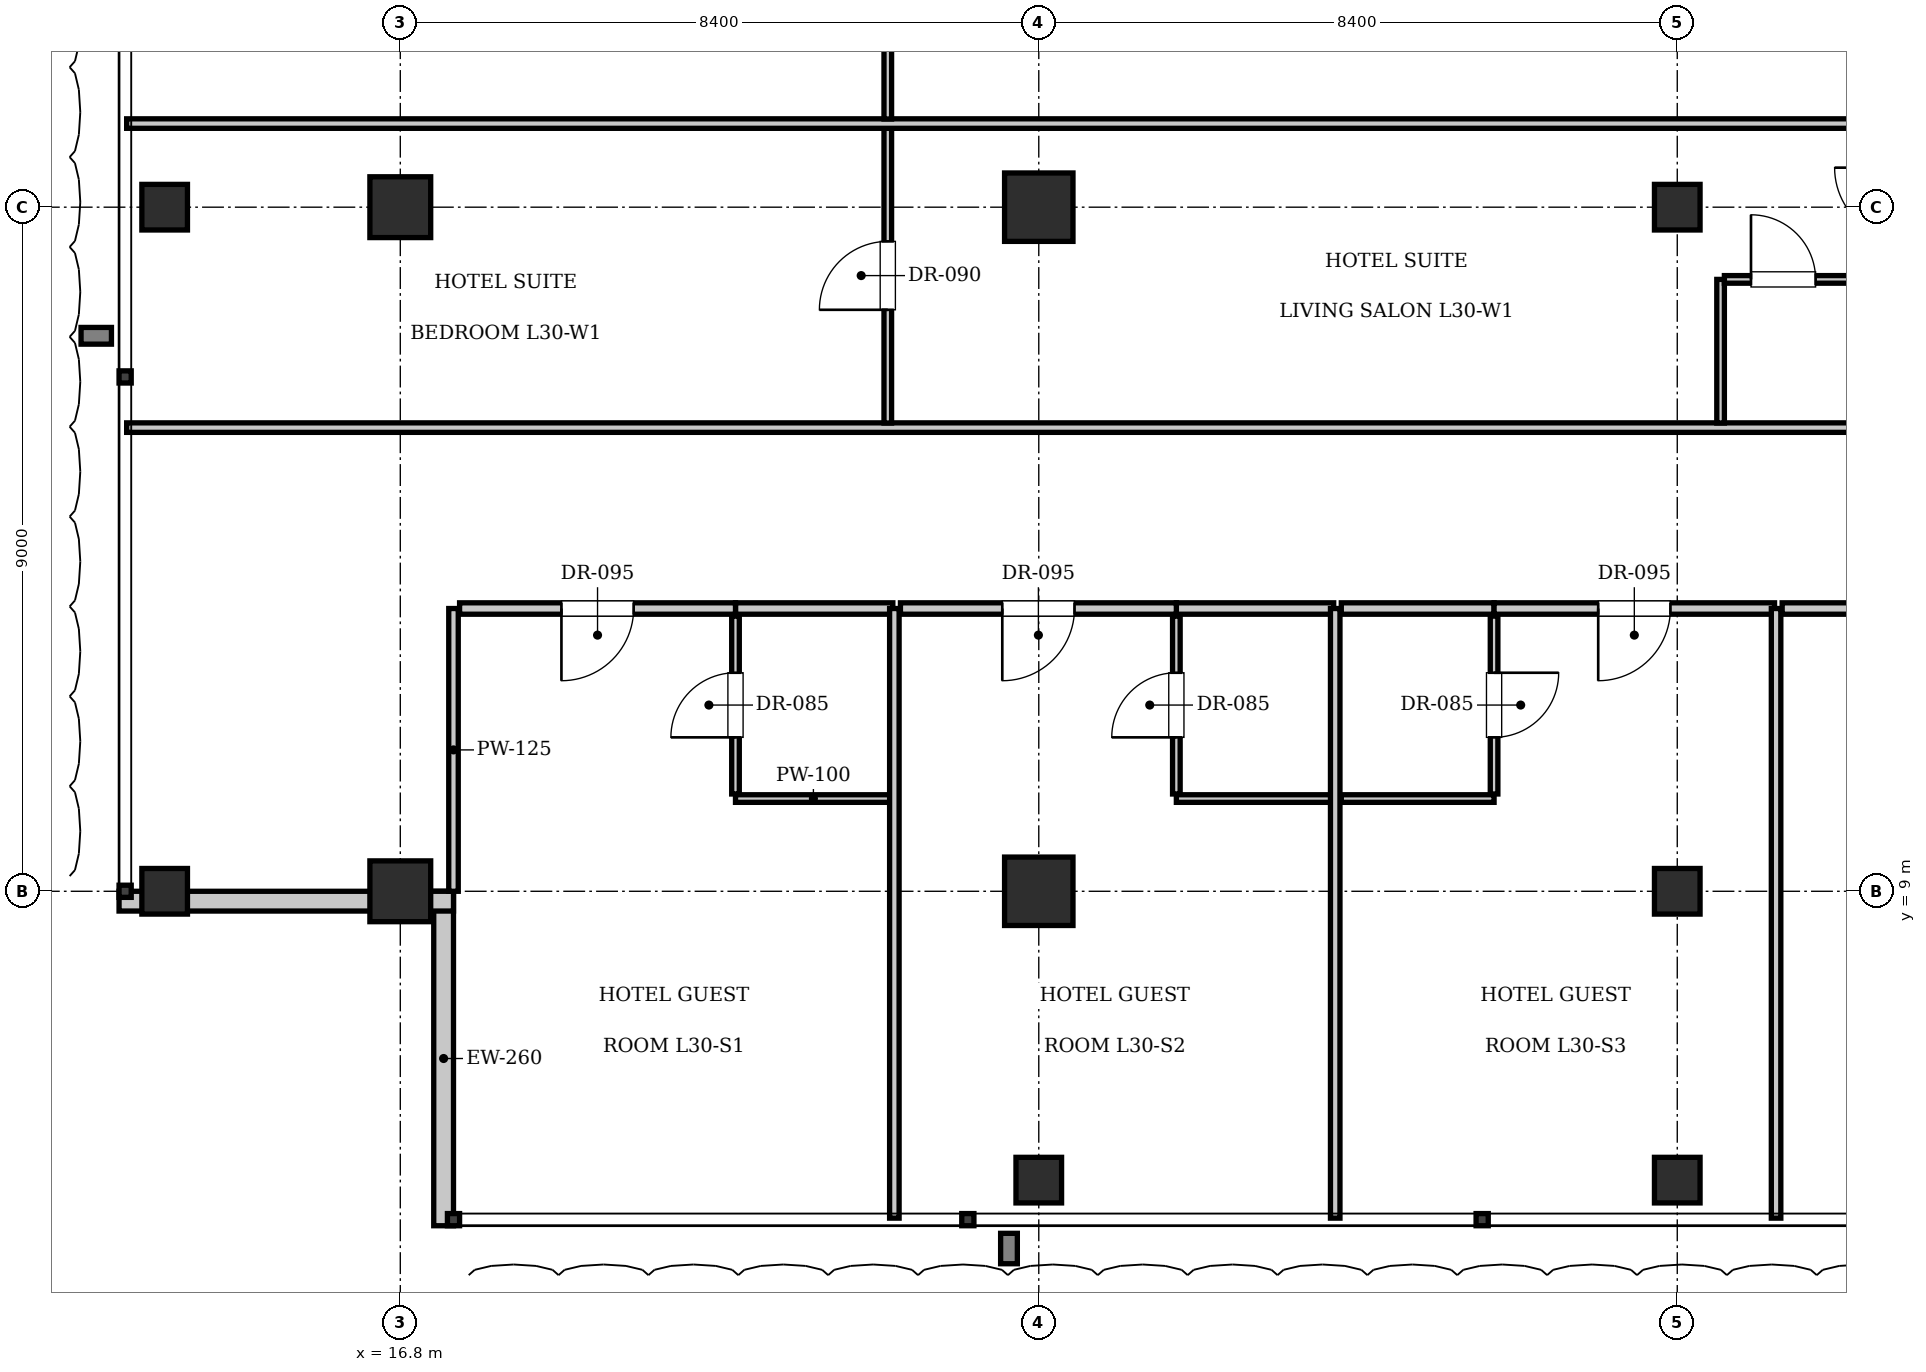
"""IFC4 building model, lengths in metres.
Left out: names, types, materials, properties, quantities, classifications, styles, units other than length and angle.
Written with IfcOpenShell. Run it as: python <this file> out.ifc"""

import sys

from ifc_helpers import new_model, si_unit, direction, frame, frame_2d, origin, origin_2d, place, context, subcontext, project, spatial, rectangle, i_section, extrude, element, fill, save


model = new_model("IFC4")
c1 = context("Model", 3, precision=1e-05, world=origin(), true_north=direction((0.0, 1.0)))
c2 = subcontext(c1, "Body", "Model", "MODEL_VIEW")
j1 = project(units=[si_unit("LENGTHUNIT", "METRE"), si_unit("PLANEANGLEUNIT", "RADIAN")], contexts=[c1])
p1 = place(None, origin())
s1 = spatial("IfcSite", under=j1, at=p1, CompositionType="ELEMENT")
p2 = place(p1, origin())
s2 = spatial("IfcBuilding", under=s1, at=p2, CompositionType="ELEMENT")
p3 = place(p2, frame((0.0, 0.0, 127.4)))
s3 = spatial("IfcBuildingStorey", under=s2, at=p3, CompositionType="ELEMENT", Elevation=127.4)
for number, where, z_axis, x_axis in (
    (1, (25.2, 18.0, 0.0), (0.0, 0.0, 1.0), (1.0, 0.0, 0.0)),
    (2, (25.2, 9.0, 0.0), (0.0, 0.0, 1.0), (1.0, 0.0, 0.0)),
):
    element("IfcColumn", number, at=place(p3, frame(where, z_axis=z_axis, x_axis=x_axis)), inside=s3, PredefinedType="COLUMN", context=c2, shape_type="SweptSolid", body=[
        extrude(rectangle(XDim=0.9, YDim=0.9, at=origin_2d()), origin(), (0.0, 0.0, 1.0), 3.85),
    ])
for number, where, z_axis, x_axis in (
    (3, (33.6, 9.0, 0.0), (0.0, 0.0, 1.0), (1.0, 0.0, 0.0)),
    (4, (33.6, 18.0, 0.0), (0.0, 0.0, 1.0), (1.0, 0.0, 0.0)),
):
    element("IfcColumn", number, at=place(p3, frame(where, z_axis=z_axis, x_axis=x_axis)), inside=s3, PredefinedType="COLUMN", context=c2, shape_type="SweptSolid", body=[
        extrude(i_section(OverallWidth=0.6, OverallDepth=0.6, WebThickness=0.025, FlangeThickness=0.038, at=origin_2d()), origin(), (0.0, 0.0, 1.0), 3.85),
    ])
for number, where, z_axis, x_axis in (
    (5, (16.8, 9.0, 0.0), (0.0, 0.0, 1.0), (1.0, 0.0, 0.0)),
    (6, (16.8, 18.0, 0.0), (0.0, 0.0, 1.0), (1.0, 0.0, 0.0)),
):
    element("IfcColumn", number, at=place(p3, frame(where, z_axis=z_axis, x_axis=x_axis)), inside=s3, PredefinedType="COLUMN", context=c2, shape_type="SweptSolid", body=[
        extrude(rectangle(XDim=0.8, YDim=0.8, at=origin_2d()), origin(), (0.0, 0.0, 1.0), 3.85),
    ])
for number, where, z_axis, x_axis in (
    (7, (13.7, 9.0, 0.0), (0.0, 0.0, 1.0), (1.0, 0.0, 0.0)),
    (8, (13.7, 18.0, 0.0), (0.0, 0.0, 1.0), (1.0, 0.0, 0.0)),
    (9, (25.2, 5.2, 0.0), (0.0, 0.0, 1.0), (1.0, 0.0, 0.0)),
    (10, (33.6, 5.2, 0.0), (0.0, 0.0, 1.0), (1.0, 0.0, 0.0)),
):
    element("IfcColumn", number, at=place(p3, frame(where, z_axis=z_axis, x_axis=x_axis)), inside=s3, PredefinedType="COLUMN", context=c2, shape_type="SweptSolid", body=[
        extrude(i_section(OverallWidth=0.6, OverallDepth=0.6, WebThickness=0.025, FlangeThickness=0.038, at=origin_2d()), origin(), (0.0, 0.0, 1.0), 3.85),
    ])
p4 = place(p3, frame((17.37, 4.6, 0.0), z_axis=(0.0, 0.0, 1.0), x_axis=(0.0, 1.0, 0.0)))
e11 = element("IfcWall", 11, at=p4, inside=s3, PredefinedType="SOLIDWALL", context=c2, shape_type="SweptSolid", body=[
    extrude(rectangle(XDim=4.4, YDim=0.26, at=frame_2d((2.2, 0.0))), origin(), (0.0, 0.0, 1.0), 3.61),
])
p5 = place(p3, frame((17.5, 8.87, 0.0), z_axis=(0.0, 0.0, 1.0), x_axis=(-1.0, 0.0, 0.0)))
e12 = element("IfcWall", 12, at=p5, inside=s3, PredefinedType="SOLIDWALL", context=c2, shape_type="SweptSolid", body=[
    extrude(rectangle(XDim=4.4, YDim=0.26, at=frame_2d((2.2, 0.0))), origin(), (0.0, 0.0, 1.0), 2.998),
])
p6 = place(p3, frame((17.5, 9.0, 0.0), z_axis=(0.0, 0.0, 1.0), x_axis=(0.0, 1.0, 0.0)))
e13 = element("IfcWall", 13, at=p6, inside=s3, PredefinedType="PARTITIONING", context=c2, shape_type="SweptSolid", body=[
    extrude(rectangle(XDim=3.72, YDim=0.125, at=frame_2d((1.86, 0.0))), origin(), (0.0, 0.0, 1.0), 3.61),
])
p7 = place(p3, frame((21.21, 12.72, 0.0), z_axis=(0.0, 0.0, 1.0), x_axis=(1.0, 0.0, 0.0)))
e14 = element("IfcWall", 14, at=p7, inside=s3, PredefinedType="PARTITIONING", context=c2, shape_type="SweptSolid", body=[
    extrude(rectangle(XDim=2.07, YDim=0.15, at=frame_2d((1.035, 0.0))), origin(), (0.0, 0.0, 1.0), 3.61),
])
p8 = place(p3, frame((21.21, 10.22, 0.0), z_axis=(0.0, 0.0, 1.0), x_axis=(1.0, 0.0, 0.0)))
e15 = element("IfcWall", 15, at=p8, inside=s3, PredefinedType="PARTITIONING", context=c2, shape_type="SweptSolid", body=[
    extrude(rectangle(XDim=2.05, YDim=0.1, at=frame_2d((1.025, 0.0))), origin(), (0.0, 0.0, 1.0), 3.61),
])
p9 = place(p3, frame((21.21, 10.28, 0.0), z_axis=(0.0, 0.0, 1.0), x_axis=(0.0, 1.0, 0.0)))
e16 = element("IfcWall", 16, at=p9, inside=s3, PredefinedType="PARTITIONING", context=c2, shape_type="SweptSolid", body=[
    extrude(rectangle(XDim=2.34, YDim=0.1, at=frame_2d((1.17, 0.0))), origin(), (0.0, 0.0, 1.0), 3.61),
])
p10 = place(p9, frame((0.745, 0.0, 0.0)))
e17 = element("IfcOpeningElement", 17, at=p10, cuts=e16, PredefinedType="OPENING", context=c2, shape_type="SweptSolid", body=[
    extrude(rectangle(XDim=0.85, YDim=2.1, at=frame_2d((0.425, 1.05))), frame((0.0, 0.06, 0.0), z_axis=(0.0, -1.0, 0.0), x_axis=(1.0, 0.0, 0.0)), (0.0, 0.0, 1.0), 0.12),
])
p11 = place(p3, frame((17.58, 12.72, 0.0), z_axis=(0.0, 0.0, 1.0), x_axis=(1.0, 0.0, 0.0)))
e18 = element("IfcWall", 18, at=p11, inside=s3, PredefinedType="PARTITIONING", context=c2, shape_type="SweptSolid", body=[
    extrude(rectangle(XDim=3.63, YDim=0.15, at=frame_2d((1.815, 0.0))), origin(), (0.0, 0.0, 1.0), 3.61),
])
p12 = place(p11, frame((1.34, 0.0, 0.0)))
e19 = element("IfcOpeningElement", 19, at=p12, cuts=e18, PredefinedType="OPENING", context=c2, shape_type="SweptSolid", body=[
    extrude(rectangle(XDim=0.95, YDim=2.15, at=frame_2d((0.475, 1.075))), frame((0.0, 0.085, 0.0), z_axis=(0.0, -1.0, 0.0), x_axis=(1.0, 0.0, 0.0)), (0.0, 0.0, 1.0), 0.17),
])
p13 = place(p3, frame((23.3, 4.7, 0.0), z_axis=(0.0, 0.0, 1.0), x_axis=(0.0, 1.0, 0.0)))
e20 = element("IfcWall", 20, at=p13, inside=s3, PredefinedType="PARTITIONING", context=c2, shape_type="SweptSolid", body=[
    extrude(rectangle(XDim=8.02, YDim=0.125, at=frame_2d((4.01, 0.0))), origin(), (0.0, 0.0, 1.0), 3.61),
])
p14 = place(p3, frame((27.01, 12.72, 0.0), z_axis=(0.0, 0.0, 1.0), x_axis=(1.0, 0.0, 0.0)))
e21 = element("IfcWall", 21, at=p14, inside=s3, PredefinedType="PARTITIONING", context=c2, shape_type="SweptSolid", body=[
    extrude(rectangle(XDim=2.07, YDim=0.15, at=frame_2d((1.035, 0.0))), origin(), (0.0, 0.0, 1.0), 3.61),
])
p15 = place(p3, frame((27.01, 10.22, 0.0), z_axis=(0.0, 0.0, 1.0), x_axis=(1.0, 0.0, 0.0)))
e22 = element("IfcWall", 22, at=p15, inside=s3, PredefinedType="PARTITIONING", context=c2, shape_type="SweptSolid", body=[
    extrude(rectangle(XDim=2.05, YDim=0.1, at=frame_2d((1.025, 0.0))), origin(), (0.0, 0.0, 1.0), 3.61),
])
p16 = place(p3, frame((27.01, 10.28, 0.0), z_axis=(0.0, 0.0, 1.0), x_axis=(0.0, 1.0, 0.0)))
e23 = element("IfcWall", 23, at=p16, inside=s3, PredefinedType="PARTITIONING", context=c2, shape_type="SweptSolid", body=[
    extrude(rectangle(XDim=2.34, YDim=0.1, at=frame_2d((1.17, 0.0))), origin(), (0.0, 0.0, 1.0), 3.61),
])
p17 = place(p16, frame((0.745, 0.0, 0.0)))
e24 = element("IfcOpeningElement", 24, at=p17, cuts=e23, PredefinedType="OPENING", context=c2, shape_type="SweptSolid", body=[
    extrude(rectangle(XDim=0.85, YDim=2.1, at=frame_2d((0.425, 1.05))), frame((0.0, 0.06, 0.0), z_axis=(0.0, -1.0, 0.0), x_axis=(1.0, 0.0, 0.0)), (0.0, 0.0, 1.0), 0.12),
])
p18 = place(p3, frame((23.38, 12.72, 0.0), z_axis=(0.0, 0.0, 1.0), x_axis=(1.0, 0.0, 0.0)))
e25 = element("IfcWall", 25, at=p18, inside=s3, PredefinedType="PARTITIONING", context=c2, shape_type="SweptSolid", body=[
    extrude(rectangle(XDim=3.63, YDim=0.15, at=frame_2d((1.815, 0.0))), origin(), (0.0, 0.0, 1.0), 3.61),
])
p19 = place(p18, frame((1.34, 0.0, 0.0)))
e26 = element("IfcOpeningElement", 26, at=p19, cuts=e25, PredefinedType="OPENING", context=c2, shape_type="SweptSolid", body=[
    extrude(rectangle(XDim=0.95, YDim=2.15, at=frame_2d((0.475, 1.075))), frame((0.0, 0.085, 0.0), z_axis=(0.0, -1.0, 0.0), x_axis=(1.0, 0.0, 0.0)), (0.0, 0.0, 1.0), 0.17),
])
p20 = place(p3, frame((29.1, 4.7, 0.0), z_axis=(0.0, 0.0, 1.0), x_axis=(0.0, 1.0, 0.0)))
e27 = element("IfcWall", 27, at=p20, inside=s3, PredefinedType="PARTITIONING", context=c2, shape_type="SweptSolid", body=[
    extrude(rectangle(XDim=8.02, YDim=0.125, at=frame_2d((4.01, 0.0))), origin(), (0.0, 0.0, 1.0), 3.61),
])
p21 = place(p3, frame((29.18, 12.72, 0.0), z_axis=(0.0, 0.0, 1.0), x_axis=(1.0, 0.0, 0.0)))
e28 = element("IfcWall", 28, at=p21, inside=s3, PredefinedType="PARTITIONING", context=c2, shape_type="SweptSolid", body=[
    extrude(rectangle(XDim=2.01, YDim=0.15, at=frame_2d((1.005, 0.0))), origin(), (0.0, 0.0, 1.0), 3.61),
])
p22 = place(p3, frame((29.18, 10.22, 0.0), z_axis=(0.0, 0.0, 1.0), x_axis=(1.0, 0.0, 0.0)))
e29 = element("IfcWall", 29, at=p22, inside=s3, PredefinedType="PARTITIONING", context=c2, shape_type="SweptSolid", body=[
    extrude(rectangle(XDim=2.01, YDim=0.1, at=frame_2d((1.005, 0.0))), origin(), (0.0, 0.0, 1.0), 3.61),
])
p23 = place(p3, frame((31.19, 10.28, 0.0), z_axis=(0.0, 0.0, 1.0), x_axis=(0.0, 1.0, 0.0)))
e30 = element("IfcWall", 30, at=p23, inside=s3, PredefinedType="PARTITIONING", context=c2, shape_type="SweptSolid", body=[
    extrude(rectangle(XDim=2.34, YDim=0.1, at=frame_2d((1.17, 0.0))), origin(), (0.0, 0.0, 1.0), 3.61),
])
p24 = place(p23, frame((0.745, 0.0, 0.0)))
e31 = element("IfcOpeningElement", 31, at=p24, cuts=e30, PredefinedType="OPENING", context=c2, shape_type="SweptSolid", body=[
    extrude(rectangle(XDim=0.85, YDim=2.1, at=frame_2d((0.425, 1.05))), frame((0.0, 0.06, 0.0), z_axis=(0.0, -1.0, 0.0), x_axis=(1.0, 0.0, 0.0)), (0.0, 0.0, 1.0), 0.12),
])
p25 = place(p3, frame((31.19, 12.72, 0.0), z_axis=(0.0, 0.0, 1.0), x_axis=(1.0, 0.0, 0.0)))
e32 = element("IfcWall", 32, at=p25, inside=s3, PredefinedType="PARTITIONING", context=c2, shape_type="SweptSolid", body=[
    extrude(rectangle(XDim=3.69, YDim=0.15, at=frame_2d((1.845, 0.0))), origin(), (0.0, 0.0, 1.0), 3.61),
])
p26 = place(p25, frame((1.37, 0.0, 0.0)))
e33 = element("IfcOpeningElement", 33, at=p26, cuts=e32, PredefinedType="OPENING", context=c2, shape_type="SweptSolid", body=[
    extrude(rectangle(XDim=0.95, YDim=2.15, at=frame_2d((0.475, 1.075))), frame((0.0, 0.085, 0.0), z_axis=(0.0, -1.0, 0.0), x_axis=(1.0, 0.0, 0.0)), (0.0, 0.0, 1.0), 0.17),
])
p27 = place(p3, frame((34.9, 4.7, 0.0), z_axis=(0.0, 0.0, 1.0), x_axis=(0.0, 1.0, 0.0)))
e34 = element("IfcWall", 34, at=p27, inside=s3, PredefinedType="PARTITIONING", context=c2, shape_type="SweptSolid", body=[
    extrude(rectangle(XDim=8.02, YDim=0.125, at=frame_2d((4.01, 0.0))), origin(), (0.0, 0.0, 1.0), 3.61),
])
p28 = place(p3, frame((34.98, 12.72, 0.0), z_axis=(0.0, 0.0, 1.0), x_axis=(1.0, 0.0, 0.0)))
e35 = element("IfcWall", 35, at=p28, inside=s3, PredefinedType="PARTITIONING", context=c2, shape_type="SweptSolid", body=[
    extrude(rectangle(XDim=3.63, YDim=0.15, at=frame_2d((1.815, 0.0))), origin(), (0.0, 0.0, 1.0), 3.61),
])
p29 = place(p28, frame((1.34, 0.0, 0.0)))
e36 = element("IfcOpeningElement", 36, at=p29, cuts=e35, PredefinedType="OPENING", context=c2, shape_type="SweptSolid", body=[
    extrude(rectangle(XDim=0.95, YDim=2.15, at=frame_2d((0.475, 1.075))), frame((0.0, 0.085, 0.0), z_axis=(0.0, -1.0, 0.0), x_axis=(1.0, 0.0, 0.0)), (0.0, 0.0, 1.0), 0.17),
])
p30 = place(p3, frame((13.2, 15.1, 0.0), z_axis=(0.0, 0.0, 1.0), x_axis=(1.0, 0.0, 0.0)))
e37 = element("IfcWall", 37, at=p30, inside=s3, PredefinedType="PARTITIONING", context=c2, shape_type="SweptSolid", body=[
    extrude(rectangle(XDim=23.42, YDim=0.125, at=frame_2d((11.71, 0.0))), origin(), (0.0, 0.0, 1.0), 3.61),
])
p31 = place(p3, frame((34.17, 15.16, 0.0), z_axis=(0.0, 0.0, 1.0), x_axis=(0.0, 1.0, 0.0)))
e38 = element("IfcWall", 38, at=p31, inside=s3, PredefinedType="PARTITIONING", context=c2, shape_type="SweptSolid", body=[
    extrude(rectangle(XDim=1.89, YDim=0.1, at=frame_2d((0.945, 0.0))), origin(), (0.0, 0.0, 1.0), 3.61),
])
p32 = place(p3, frame((34.22, 17.05, 0.0), z_axis=(0.0, 0.0, 1.0), x_axis=(1.0, 0.0, 0.0)))
e39 = element("IfcWall", 39, at=p32, inside=s3, PredefinedType="PARTITIONING", context=c2, shape_type="SweptSolid", body=[
    extrude(rectangle(XDim=2.3, YDim=0.1, at=frame_2d((1.15, 0.0))), origin(), (0.0, 0.0, 1.0), 3.61),
])
p33 = place(p32, frame((0.35, 0.0, 0.0)))
e40 = element("IfcOpeningElement", 40, at=p33, cuts=e39, PredefinedType="OPENING", context=c2, shape_type="SweptSolid", body=[
    extrude(rectangle(XDim=0.85, YDim=2.1, at=frame_2d((0.425, 1.05))), frame((0.0, 0.06, 0.0), z_axis=(0.0, -1.0, 0.0), x_axis=(1.0, 0.0, 0.0)), (0.0, 0.0, 1.0), 0.12),
])
p34 = place(p3, frame((23.214, 15.16, 0.0), z_axis=(0.0, 0.0, 1.0), x_axis=(0.0, 1.0, 0.0)))
e41 = element("IfcWall", 41, at=p34, inside=s3, PredefinedType="PARTITIONING", context=c2, shape_type="SweptSolid", body=[
    extrude(rectangle(XDim=3.88, YDim=0.1, at=frame_2d((1.94, 0.0))), origin(), (0.0, 0.0, 1.0), 3.61),
])
p35 = place(p34, frame((1.49, 0.0, 0.0)))
e42 = element("IfcOpeningElement", 42, at=p35, cuts=e41, PredefinedType="OPENING", context=c2, shape_type="SweptSolid", body=[
    extrude(rectangle(XDim=0.9, YDim=2.1, at=frame_2d((0.45, 1.05))), frame((0.0, 0.06, 0.0), z_axis=(0.0, -1.0, 0.0), x_axis=(1.0, 0.0, 0.0)), (0.0, 0.0, 1.0), 0.12),
])
p36 = place(p3, frame((13.2, 19.1, 0.0), z_axis=(0.0, 0.0, 1.0), x_axis=(1.0, 0.0, 0.0)))
e43 = element("IfcWall", 43, at=p36, inside=s3, PredefinedType="PARTITIONING", context=c2, shape_type="SweptSolid", body=[
    extrude(rectangle(XDim=23.42, YDim=0.125, at=frame_2d((11.71, 0.0))), origin(), (0.0, 0.0, 1.0), 3.61),
])
p37 = place(p3, frame((23.214, 19.16, 0.0), z_axis=(0.0, 0.0, 1.0), x_axis=(0.0, 1.0, 0.0)))
e44 = element("IfcWall", 44, at=p37, inside=s3, PredefinedType="PARTITIONING", context=c2, shape_type="SweptSolid", body=[
    extrude(rectangle(XDim=3.88, YDim=0.1, at=frame_2d((1.94, 0.0))), origin(), (0.0, 0.0, 1.0), 3.61),
])
p38 = place(p37, frame((1.49, 0.0, 0.0)))
e45 = element("IfcOpeningElement", 45, at=p38, cuts=e44, PredefinedType="OPENING", context=c2, shape_type="SweptSolid", body=[
    extrude(rectangle(XDim=0.9, YDim=2.1, at=frame_2d((0.45, 1.05))), frame((0.0, 0.06, 0.0), z_axis=(0.0, -1.0, 0.0), x_axis=(1.0, 0.0, 0.0)), (0.0, 0.0, 1.0), 0.12),
])
p39 = place(p10, origin())
e46 = element("IfcDoor", 46, at=p39, inside=s3, OperationType="SINGLE_SWING_LEFT", PredefinedType="DOOR", context=c2, shape_type="SweptSolid", body=[
    extrude(rectangle(XDim=0.85, YDim=2.1, at=frame_2d((0.425, 1.05))), frame((0.0, 0.025, 0.0), z_axis=(0.0, -1.0, 0.0), x_axis=(1.0, 0.0, 0.0)), (0.0, 0.0, 1.0), 0.05),
])
fill(e17, e46)
p40 = place(p12, frame((0.95, 0.0, 0.0), z_axis=(0.0, 0.0, 1.0), x_axis=(-1.0, 0.0, 0.0)))
e47 = element("IfcDoor", 47, at=p40, inside=s3, OperationType="SINGLE_SWING_RIGHT", PredefinedType="DOOR", context=c2, shape_type="SweptSolid", body=[
    extrude(rectangle(XDim=0.95, YDim=2.15, at=frame_2d((0.475, 1.075))), frame((0.0, 0.025, 0.0), z_axis=(0.0, -1.0, 0.0), x_axis=(1.0, 0.0, 0.0)), (0.0, 0.0, 1.0), 0.05),
])
fill(e19, e47)
p41 = place(p17, origin())
e48 = element("IfcDoor", 48, at=p41, inside=s3, OperationType="SINGLE_SWING_LEFT", PredefinedType="DOOR", context=c2, shape_type="SweptSolid", body=[
    extrude(rectangle(XDim=0.85, YDim=2.1, at=frame_2d((0.425, 1.05))), frame((0.0, 0.025, 0.0), z_axis=(0.0, -1.0, 0.0), x_axis=(1.0, 0.0, 0.0)), (0.0, 0.0, 1.0), 0.05),
])
fill(e24, e48)
p42 = place(p19, frame((0.95, 0.0, 0.0), z_axis=(0.0, 0.0, 1.0), x_axis=(-1.0, 0.0, 0.0)))
e49 = element("IfcDoor", 49, at=p42, inside=s3, OperationType="SINGLE_SWING_RIGHT", PredefinedType="DOOR", context=c2, shape_type="SweptSolid", body=[
    extrude(rectangle(XDim=0.95, YDim=2.15, at=frame_2d((0.475, 1.075))), frame((0.0, 0.025, 0.0), z_axis=(0.0, -1.0, 0.0), x_axis=(1.0, 0.0, 0.0)), (0.0, 0.0, 1.0), 0.05),
])
fill(e26, e49)
p43 = place(p24, frame((0.85, 0.0, 0.0), z_axis=(0.0, 0.0, 1.0), x_axis=(-1.0, 0.0, 0.0)))
e50 = element("IfcDoor", 50, at=p43, inside=s3, OperationType="SINGLE_SWING_LEFT", PredefinedType="DOOR", context=c2, shape_type="SweptSolid", body=[
    extrude(rectangle(XDim=0.85, YDim=2.1, at=frame_2d((0.425, 1.05))), frame((0.0, 0.025, 0.0), z_axis=(0.0, -1.0, 0.0), x_axis=(1.0, 0.0, 0.0)), (0.0, 0.0, 1.0), 0.05),
])
fill(e31, e50)
p44 = place(p26, frame((0.95, 0.0, 0.0), z_axis=(0.0, 0.0, 1.0), x_axis=(-1.0, 0.0, 0.0)))
e51 = element("IfcDoor", 51, at=p44, inside=s3, OperationType="SINGLE_SWING_RIGHT", PredefinedType="DOOR", context=c2, shape_type="SweptSolid", body=[
    extrude(rectangle(XDim=0.95, YDim=2.15, at=frame_2d((0.475, 1.075))), frame((0.0, 0.025, 0.0), z_axis=(0.0, -1.0, 0.0), x_axis=(1.0, 0.0, 0.0)), (0.0, 0.0, 1.0), 0.05),
])
fill(e33, e51)
p45 = place(p33, origin())
e52 = element("IfcDoor", 52, at=p45, inside=s3, OperationType="SINGLE_SWING_LEFT", PredefinedType="DOOR", context=c2, shape_type="SweptSolid", body=[
    extrude(rectangle(XDim=0.85, YDim=2.1, at=frame_2d((0.425, 1.05))), frame((0.0, 0.025, 0.0), z_axis=(0.0, -1.0, 0.0), x_axis=(1.0, 0.0, 0.0)), (0.0, 0.0, 1.0), 0.05),
])
fill(e40, e52)
p46 = place(p35, origin())
e53 = element("IfcDoor", 53, at=p46, inside=s3, OperationType="SINGLE_SWING_LEFT", PredefinedType="DOOR", context=c2, shape_type="SweptSolid", body=[
    extrude(rectangle(XDim=0.9, YDim=2.1, at=frame_2d((0.45, 1.05))), frame((0.0, 0.025, 0.0), z_axis=(0.0, -1.0, 0.0), x_axis=(1.0, 0.0, 0.0)), (0.0, 0.0, 1.0), 0.05),
])
fill(e42, e53)
save(model, sys.argv[1])
